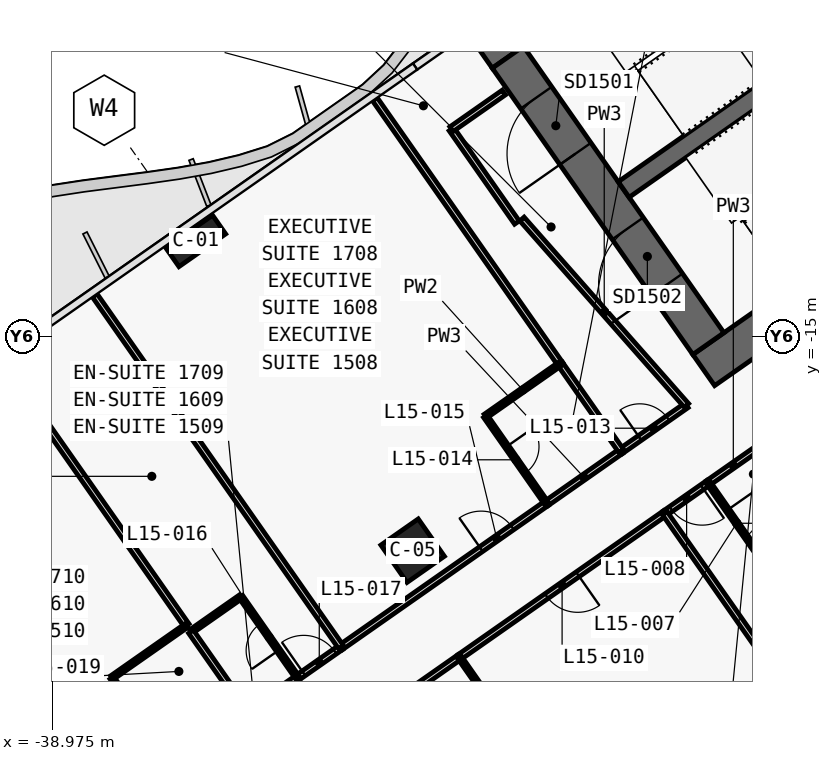
"""IFC4 building model, lengths in metres.
Left out: names, types, materials, properties, quantities, classifications, styles, units other than length and angle.
Written with IfcOpenShell. Run it as: python <this file> out.ifc"""

import sys

from ifc_helpers import new_model, si_unit, direction, frame, frame_2d, origin, origin_2d, place, context, subcontext, project, spatial, polyline, rectangle, outline, extrude, element, fill, save


model = new_model("IFC4")
c1 = context("Model", 3, precision=1e-05, world=origin(), true_north=direction((0.0, 1.0)))
c2 = subcontext(c1, "Body", "Model", "MODEL_VIEW")
j1 = project(units=[si_unit("LENGTHUNIT", "METRE"), si_unit("PLANEANGLEUNIT", "RADIAN")], contexts=[c1])
p1 = place(None, origin())
s1 = spatial("IfcSite", under=j1, at=p1, CompositionType="ELEMENT")
p2 = place(p1, origin())
s2 = spatial("IfcBuilding", under=s1, at=p2, CompositionType="ELEMENT")
p3 = place(p2, frame((0.0, 0.0, 79.7)))
s3 = spatial("IfcBuildingStorey", under=s2, at=p3, CompositionType="ELEMENT", Elevation=79.7)
p4 = place(p3, frame((0.037, 11.867, 0.0), z_axis=(0.0, 0.0, 1.0), x_axis=(-0.819155306259, -0.573571777746, 0.0)))
e1 = element("IfcWall", 1, at=p4, inside=s3, PredefinedType="SHEAR", context=c2, shape_type="SweptSolid", body=[
    extrude(outline(polyline([(33.837, 0.5), (0.7, 0.5), (0.0, -0.5), (33.837, -0.5), (33.837, 0.5)])), origin(), (0.0, 0.0, 1.0), 3.6),
])
p5 = place(p3, frame((0.037, -0.585, 0.0), z_axis=(0.0, 0.0, 1.0), x_axis=(-0.819157152511, -0.573569140985, 0.0)))
e2 = element("IfcWall", 2, at=p5, inside=s3, PredefinedType="SHEAR", context=c2, shape_type="SweptSolid", body=[
    extrude(outline(polyline([(26.695, 0.5), (0.7, 0.5), (0.0, -0.5), (26.695, -0.5), (26.695, 0.5)])), origin(), (0.0, 0.0, 1.0), 3.6),
])
p6 = place(p5, frame((2.995, 0.0, 0.0)))
e3 = element("IfcOpeningElement", 3, at=p6, cuts=e2, PredefinedType="OPENING", context=c2, shape_type="SweptSolid", body=[
    extrude(rectangle(XDim=2.4, YDim=2.1, at=frame_2d((1.2, 1.05))), frame((0.0, 0.51, 0.0), z_axis=(0.0, -1.0, 0.0), x_axis=(1.0, 0.0, 0.0)), (0.0, 0.0, 1.0), 1.02),
])
p7 = place(p5, frame((11.995, 0.0, 0.0)))
e4 = element("IfcOpeningElement", 4, at=p7, cuts=e2, PredefinedType="OPENING", context=c2, shape_type="SweptSolid", body=[
    extrude(rectangle(XDim=2.4, YDim=2.1, at=frame_2d((1.2, 1.05))), frame((0.0, 0.51, 0.0), z_axis=(0.0, -1.0, 0.0), x_axis=(1.0, 0.0, 0.0)), (0.0, 0.0, 1.0), 1.02),
])
p8 = place(p3, frame((-21.708, -15.2, 0.0), z_axis=(0.0, 0.0, 1.0), x_axis=(-0.573576324356, 0.819152122709, 0.0)))
e5 = element("IfcWall", 5, at=p8, inside=s3, PredefinedType="SHEAR", context=c2, shape_type="SweptSolid", body=[
    extrude(outline(polyline([(0.0, 0.5), (0.0, -0.5), (9.2, -0.5), (9.2, 0.5), (0.0, 0.5)])), origin(), (0.0, 0.0, 1.0), 3.6),
])
p9 = place(p8, frame((6.1, 0.0, 0.0)))
e6 = element("IfcOpeningElement", 6, at=p9, cuts=e5, PredefinedType="OPENING", context=c2, shape_type="SweptSolid", body=[
    extrude(rectangle(XDim=1.8, YDim=2.1, at=frame_2d((0.9, 1.05))), frame((0.0, 0.51, 0.0), z_axis=(0.0, -1.0, 0.0), x_axis=(1.0, 0.0, 0.0)), (0.0, 0.0, 1.0), 1.02),
])
p10 = place(p8, frame((1.9, 0.0, 0.0)))
e7 = element("IfcOpeningElement", 7, at=p10, cuts=e5, PredefinedType="OPENING", context=c2, shape_type="SweptSolid", body=[
    extrude(rectangle(XDim=1.8, YDim=2.1, at=frame_2d((0.9, 1.05))), frame((0.0, 0.51, 0.0), z_axis=(0.0, -1.0, 0.0), x_axis=(1.0, 0.0, 0.0)), (0.0, 0.0, 1.0), 1.02),
])
p11 = place(p3, frame((-2.638, 3.768, 0.0), z_axis=(0.0, 0.0, 1.0), x_axis=(-0.819148977158, -0.573580816643, 0.0)))
e8 = element("IfcWall", 8, at=p11, inside=s3, PredefinedType="SHEAR", context=c2, shape_type="SweptSolid", body=[
    extrude(outline(polyline([(26.0, 0.25), (0.0, 0.25), (0.0, -0.25), (26.0, -0.25), (26.0, 0.25)])), origin(), (0.0, 0.0, 1.0), 3.6),
])
p12 = place(p11, frame((1.169, 0.0, 0.0)))
e9 = element("IfcOpeningElement", 9, at=p12, cuts=e8, PredefinedType="OPENING", context=c2, shape_type="SweptSolid", body=[
    extrude(rectangle(XDim=1.1, YDim=2.1, at=frame_2d((0.55, 1.05))), frame((0.0, 0.26, 0.0), z_axis=(0.0, -1.0, 0.0), x_axis=(1.0, 0.0, 0.0)), (0.0, 0.0, 1.0), 0.52),
])
p13 = place(p11, frame((3.206, 0.0, 0.0)))
e10 = element("IfcOpeningElement", 10, at=p13, cuts=e8, PredefinedType="OPENING", context=c2, shape_type="SweptSolid", body=[
    extrude(rectangle(XDim=1.1, YDim=2.1, at=frame_2d((0.55, 1.05))), frame((0.0, 0.26, 0.0), z_axis=(0.0, -1.0, 0.0), x_axis=(1.0, 0.0, 0.0)), (0.0, 0.0, 1.0), 0.52),
])
p14 = place(p11, frame((5.244, 0.0, 0.0)))
e11 = element("IfcOpeningElement", 11, at=p14, cuts=e8, PredefinedType="OPENING", context=c2, shape_type="SweptSolid", body=[
    extrude(rectangle(XDim=1.1, YDim=2.1, at=frame_2d((0.55, 1.05))), frame((0.0, 0.26, 0.0), z_axis=(0.0, -1.0, 0.0), x_axis=(1.0, 0.0, 0.0)), (0.0, 0.0, 1.0), 0.52),
])
p15 = place(p11, frame((7.281, 0.0, 0.0)))
e12 = element("IfcOpeningElement", 12, at=p15, cuts=e8, PredefinedType="OPENING", context=c2, shape_type="SweptSolid", body=[
    extrude(rectangle(XDim=1.1, YDim=2.1, at=frame_2d((0.55, 1.05))), frame((0.0, 0.26, 0.0), z_axis=(0.0, -1.0, 0.0), x_axis=(1.0, 0.0, 0.0)), (0.0, 0.0, 1.0), 0.52),
])
p16 = place(p11, frame((9.688, 0.0, 0.0)))
e13 = element("IfcOpeningElement", 13, at=p16, cuts=e8, PredefinedType="OPENING", context=c2, shape_type="SweptSolid", body=[
    extrude(rectangle(XDim=1.1, YDim=2.1, at=frame_2d((0.55, 1.05))), frame((0.0, 0.26, 0.0), z_axis=(0.0, -1.0, 0.0), x_axis=(1.0, 0.0, 0.0)), (0.0, 0.0, 1.0), 0.52),
])
p17 = place(p11, frame((11.863, 0.0, 0.0)))
e14 = element("IfcOpeningElement", 14, at=p17, cuts=e8, PredefinedType="OPENING", context=c2, shape_type="SweptSolid", body=[
    extrude(rectangle(XDim=1.1, YDim=2.1, at=frame_2d((0.55, 1.05))), frame((0.0, 0.26, 0.0), z_axis=(0.0, -1.0, 0.0), x_axis=(1.0, 0.0, 0.0)), (0.0, 0.0, 1.0), 0.52),
])
p18 = place(p11, frame((14.038, 0.0, 0.0)))
e15 = element("IfcOpeningElement", 15, at=p18, cuts=e8, PredefinedType="OPENING", context=c2, shape_type="SweptSolid", body=[
    extrude(rectangle(XDim=1.1, YDim=2.1, at=frame_2d((0.55, 1.05))), frame((0.0, 0.26, 0.0), z_axis=(0.0, -1.0, 0.0), x_axis=(1.0, 0.0, 0.0)), (0.0, 0.0, 1.0), 0.52),
])
p19 = place(p11, frame((16.212, 0.0, 0.0)))
e16 = element("IfcOpeningElement", 16, at=p19, cuts=e8, PredefinedType="OPENING", context=c2, shape_type="SweptSolid", body=[
    extrude(rectangle(XDim=1.1, YDim=2.1, at=frame_2d((0.55, 1.05))), frame((0.0, 0.26, 0.0), z_axis=(0.0, -1.0, 0.0), x_axis=(1.0, 0.0, 0.0)), (0.0, 0.0, 1.0), 0.52),
])
p20 = place(p3, frame((-35.197, -12.498, 0.0), z_axis=(0.0, 0.0, 1.0), x_axis=(-0.819152044289, -0.573576436351, 0.0)))
e17 = element("IfcColumn", 17, at=p20, inside=s3, PredefinedType="COLUMN", context=c2, shape_type="SweptSolid", body=[
    extrude(rectangle(XDim=1.5, YDim=0.6, at=origin_2d()), origin(), (0.0, 0.0, 1.0), 3.6),
])
p21 = place(p3, frame((-29.49, -20.649, 0.0), z_axis=(0.0, 0.0, 1.0), x_axis=(-0.819152044289, -0.573576436351, 0.0)))
e18 = element("IfcColumn", 18, at=p21, inside=s3, PredefinedType="COLUMN", context=c2, shape_type="SweptSolid", body=[
    extrude(rectangle(XDim=1.2, YDim=1.2, at=origin_2d()), origin(), (0.0, 0.0, 1.0), 3.6),
])
p22 = place(p3, frame((-24.003, -18.028, 0.0), z_axis=(0.0, 0.0, 1.0), x_axis=(0.819160859995, 0.573563846013, 0.0)))
e19 = element("IfcWall", 19, at=p22, inside=s3, PredefinedType="PARTITIONING", context=c2, shape_type="SweptSolid", body=[
    extrude(rectangle(XDim=2.098, YDim=0.15, at=frame_2d((1.049, 0.0))), origin(), (0.0, 0.0, 1.0), 3.32),
])
p23 = place(p22, frame((0.599, 0.0, 0.0)))
e20 = element("IfcOpeningElement", 20, at=p23, cuts=e19, PredefinedType="OPENING", context=c2, shape_type="SweptSolid", body=[
    extrude(rectangle(XDim=0.9, YDim=2.1, at=frame_2d((0.45, 1.05))), frame((0.0, 0.085, 0.0), z_axis=(0.0, -1.0, 0.0), x_axis=(1.0, 0.0, 0.0)), (0.0, 0.0, 1.0), 0.17),
])
p24 = place(p3, frame((-31.375, -23.19, 0.0), z_axis=(0.0, 0.0, 1.0), x_axis=(0.819171118839, 0.573549194106, 0.0)))
e21 = element("IfcWall", 21, at=p24, inside=s3, PredefinedType="PARTITIONING", context=c2, shape_type="SweptSolid", body=[
    extrude(rectangle(XDim=6.603, YDim=0.15, at=frame_2d((3.302, 0.0))), origin(), (0.0, 0.0, 1.0), 2.6),
])
p25 = place(p24, frame((4.502, 0.0, 0.0)))
e22 = element("IfcOpeningElement", 22, at=p25, cuts=e21, PredefinedType="OPENING", context=c2, shape_type="SweptSolid", body=[
    extrude(rectangle(XDim=1.0, YDim=2.1, at=frame_2d((0.5, 1.05))), frame((0.0, 0.085, 0.0), z_axis=(0.0, -1.0, 0.0), x_axis=(1.0, 0.0, 0.0)), (0.0, 0.0, 1.0), 0.17),
])
p26 = place(p3, frame((-25.969, -19.404, 0.0), z_axis=(0.0, 0.0, 1.0), x_axis=(0.819146032251, 0.573585022335, 0.0)))
e23 = element("IfcWall", 23, at=p26, inside=s3, PredefinedType="PARTITIONING", context=c2, shape_type="SweptSolid", body=[
    extrude(rectangle(XDim=2.404, YDim=0.15, at=frame_2d((1.202, 0.0))), origin(), (0.0, 0.0, 1.0), 3.32),
])
p27 = place(p3, frame((-32.521, -23.992, 0.0), z_axis=(0.0, 0.0, 1.0), x_axis=(0.819199220913, 0.573509055252, 0.0)))
e24 = element("IfcWall", 24, at=p27, inside=s3, PredefinedType="PARTITIONING", context=c2, shape_type="SweptSolid", body=[
    extrude(rectangle(XDim=1.403, YDim=0.15, at=frame_2d((0.702, 0.0))), origin(), (0.0, 0.0, 1.0), 3.32),
])
p28 = place(p27, frame((0.201, 0.0, 0.0)))
e25 = element("IfcOpeningElement", 25, at=p28, cuts=e24, PredefinedType="OPENING", context=c2, shape_type="SweptSolid", body=[
    extrude(rectangle(XDim=1.0, YDim=2.1, at=frame_2d((0.5, 1.05))), frame((0.0, 0.085, 0.0), z_axis=(0.0, -1.0, 0.0), x_axis=(1.0, 0.0, 0.0)), (0.0, 0.0, 1.0), 0.17),
])
p29 = place(p3, frame((-33.833, -24.91, 0.0), z_axis=(0.0, 0.0, 1.0), x_axis=(0.819189013667, 0.573523634986, 0.0)))
e26 = element("IfcWall", 26, at=p29, inside=s3, PredefinedType="PARTITIONING", context=c2, shape_type="SweptSolid", body=[
    extrude(rectangle(XDim=1.604, YDim=0.15, at=frame_2d((0.802, 0.0))), origin(), (0.0, 0.0, 1.0), 3.32),
])
p30 = place(p3, frame((-21.706, -18.861, 0.0), z_axis=(0.0, 0.0, 1.0), x_axis=(-0.819060210533, -0.573707566205, 0.0)))
e27 = element("IfcWall", 27, at=p30, inside=s3, PredefinedType="PARTITIONING", context=c2, shape_type="SweptSolid", body=[
    extrude(rectangle(XDim=1.403, YDim=0.15, at=frame_2d((0.702, 0.0))), origin(), (0.0, 0.0, 1.0), 3.32),
])
p31 = place(p30, frame((0.201, 0.0, 0.0)))
e28 = element("IfcOpeningElement", 28, at=p31, cuts=e27, PredefinedType="OPENING", context=c2, shape_type="SweptSolid", body=[
    extrude(rectangle(XDim=1.0, YDim=2.1, at=frame_2d((0.5, 1.05))), frame((0.0, 0.085, 0.0), z_axis=(0.0, -1.0, 0.0), x_axis=(1.0, 0.0, 0.0)), (0.0, 0.0, 1.0), 0.17),
])
p32 = place(p3, frame((-20.395, -17.943, 0.0), z_axis=(0.0, 0.0, 1.0), x_axis=(-0.819189013667, -0.573523634986, 0.0)))
e29 = element("IfcWall", 29, at=p32, inside=s3, PredefinedType="PARTITIONING", context=c2, shape_type="SweptSolid", body=[
    extrude(rectangle(XDim=1.604, YDim=0.15, at=frame_2d((0.802, 0.0))), origin(), (0.0, 0.0, 1.0), 2.6),
])
p33 = place(p3, frame((-22.852, -19.664, 0.0), z_axis=(0.0, 0.0, 1.0), x_axis=(-0.819141582452, -0.573591377113, 0.0)))
e30 = element("IfcWall", 30, at=p33, inside=s3, PredefinedType="PARTITIONING", context=c2, shape_type="SweptSolid", body=[
    extrude(rectangle(XDim=6.603, YDim=0.15, at=frame_2d((3.301, 0.0))), origin(), (0.0, 0.0, 1.0), 2.6),
])
p34 = place(p33, frame((2.802, 0.0, 0.0)))
e31 = element("IfcOpeningElement", 31, at=p34, cuts=e30, PredefinedType="OPENING", context=c2, shape_type="SweptSolid", body=[
    extrude(rectangle(XDim=1.0, YDim=2.1, at=frame_2d((0.5, 1.05))), frame((0.0, 0.085, 0.0), z_axis=(0.0, -1.0, 0.0), x_axis=(1.0, 0.0, 0.0)), (0.0, 0.0, 1.0), 0.17),
])
p35 = place(p3, frame((-28.259, -23.449, 0.0), z_axis=(0.0, 0.0, 1.0), x_axis=(-0.819146032251, -0.573585022335, 0.0)))
e32 = element("IfcWall", 32, at=p35, inside=s3, PredefinedType="PARTITIONING", context=c2, shape_type="SweptSolid", body=[
    extrude(rectangle(XDim=2.404, YDim=0.15, at=frame_2d((1.202, 0.0))), origin(), (0.0, 0.0, 1.0), 3.32),
])
p36 = place(p3, frame((-26.746, -12.014, 0.0), z_axis=(0.0, 0.0, 1.0), x_axis=(-0.573560650686, 0.819163097304, 0.0)))
e33 = element("IfcWall", 33, at=p36, inside=s3, PredefinedType="PARTITIONING", context=c2, shape_type="SweptSolid", body=[
    extrude(rectangle(XDim=3.0, YDim=0.15, at=frame_2d((1.5, 0.0))), origin(), (0.0, 0.0, 1.0), 3.32),
])
p37 = place(p3, frame((-28.467, -9.556, 0.0), z_axis=(0.0, 0.0, 1.0), x_axis=(0.819109000826, 0.573637903879, 0.0)))
e34 = element("IfcWall", 34, at=p37, inside=s3, PredefinedType="PARTITIONING", context=c2, shape_type="SweptSolid", body=[
    extrude(rectangle(XDim=1.68, YDim=0.15, at=frame_2d((0.84, 0.0))), origin(), (0.0, 0.0, 1.0), 3.32),
])
p38 = place(p3, frame((-22.284, -16.827, 0.0), z_axis=(0.0, 0.0, 1.0), x_axis=(-0.661545117561, 0.749905365651, 0.0)))
e35 = element("IfcWall", 35, at=p38, inside=s3, PredefinedType="PARTITIONING", context=c2, shape_type="SweptSolid", body=[
    extrude(rectangle(XDim=6.543, YDim=0.15, at=frame_2d((3.271, 0.0))), origin(), (0.0, 0.0, 1.0), 2.6),
])
p39 = place(p3, frame((-25.606, -15.734, 0.0), z_axis=(0.0, 0.0, 1.0), x_axis=(-0.573576058406, 0.819152308929, 0.0)))
e36 = element("IfcWall", 36, at=p39, inside=s3, PredefinedType="PARTITIONING", context=c2, shape_type="SweptSolid", body=[
    extrude(rectangle(XDim=8.501, YDim=0.15, at=frame_2d((4.25, 0.0))), origin(), (0.0, 0.0, 1.0), 2.6),
])
p40 = place(p3, frame((-24.001, -18.026, 0.0), z_axis=(0.0, 0.0, 1.0), x_axis=(-0.573596837309, 0.819137759006, 0.0)))
e37 = element("IfcWall", 37, at=p40, inside=s3, PredefinedType="PARTITIONING", context=c2, shape_type="SweptSolid", body=[
    extrude(rectangle(XDim=2.802, YDim=0.15, at=frame_2d((1.401, 0.0))), origin(), (0.0, 0.0, 1.0), 2.6),
])
p41 = place(p3, frame((-25.608, -15.732, 0.0), z_axis=(0.0, 0.0, 1.0), x_axis=(-0.819107643868, -0.573639841501, 0.0)))
e38 = element("IfcWall", 38, at=p41, inside=s3, PredefinedType="PARTITIONING", context=c2, shape_type="SweptSolid", body=[
    extrude(rectangle(XDim=2.4, YDim=0.12, at=frame_2d((1.2, 0.0))), origin(), (0.0, 0.0, 1.0), 3.32),
])
p42 = place(p3, frame((-27.574, -17.11, 0.0), z_axis=(0.0, 0.0, 1.0), x_axis=(0.573591086599, -0.819141785879, 0.0)))
e39 = element("IfcWall", 39, at=p42, inside=s3, PredefinedType="PARTITIONING", context=c2, shape_type="SweptSolid", body=[
    extrude(rectangle(XDim=2.8, YDim=0.12, at=frame_2d((1.4, 0.0))), origin(), (0.0, 0.0, 1.0), 2.6),
])
p43 = place(p42, frame((0.975, 0.0, 0.0)))
e40 = element("IfcOpeningElement", 40, at=p43, cuts=e39, PredefinedType="OPENING", context=c2, shape_type="SweptSolid", body=[
    extrude(rectangle(XDim=0.85, YDim=2.05, at=frame_2d((0.425, 1.025))), frame((0.0, 0.07, 0.0), z_axis=(0.0, -1.0, 0.0), x_axis=(1.0, 0.0, 0.0)), (0.0, 0.0, 1.0), 0.14),
])
p44 = place(p3, frame((-31.373, -23.189, 0.0), z_axis=(0.0, 0.0, 1.0), x_axis=(-0.573571089604, 0.819155788095, 0.0)))
e41 = element("IfcWall", 41, at=p44, inside=s3, PredefinedType="PARTITIONING", context=c2, shape_type="SweptSolid", body=[
    extrude(rectangle(XDim=11.3, YDim=0.15, at=frame_2d((5.65, 0.0))), origin(), (0.0, 0.0, 1.0), 2.5),
])
p45 = place(p3, frame((-32.519, -23.991, 0.0), z_axis=(0.0, 0.0, 1.0), x_axis=(-0.573537965655, 0.819178980414, 0.0)))
e42 = element("IfcWall", 42, at=p45, inside=s3, PredefinedType="PARTITIONING", context=c2, shape_type="SweptSolid", body=[
    extrude(rectangle(XDim=2.6, YDim=0.12, at=frame_2d((1.3, 0.0))), origin(), (0.0, 0.0, 1.0), 2.6),
])
p46 = place(p45, frame((0.875, 0.0, 0.0)))
e43 = element("IfcOpeningElement", 43, at=p46, cuts=e42, PredefinedType="OPENING", context=c2, shape_type="SweptSolid", body=[
    extrude(rectangle(XDim=0.85, YDim=2.05, at=frame_2d((0.425, 1.025))), frame((0.0, 0.07, 0.0), z_axis=(0.0, -1.0, 0.0), x_axis=(1.0, 0.0, 0.0)), (0.0, 0.0, 1.0), 0.14),
])
p47 = place(p3, frame((-34.012, -21.861, 0.0), z_axis=(0.0, 0.0, 1.0), x_axis=(-0.81918174131, -0.573534022273, 0.0)))
e44 = element("IfcWall", 44, at=p47, inside=s3, PredefinedType="PARTITIONING", context=c2, shape_type="SweptSolid", body=[
    extrude(rectangle(XDim=1.6, YDim=0.12, at=frame_2d((0.8, 0.0))), origin(), (0.0, 0.0, 1.0), 3.32),
])
p48 = place(p3, frame((-35.436, -22.617, 0.0), z_axis=(0.0, 0.0, 1.0), x_axis=(-0.57356256513, 0.819161756848, 0.0)))
e45 = element("IfcWall", 45, at=p48, inside=s3, PredefinedType="PARTITIONING", context=c2, shape_type="SweptSolid", body=[
    extrude(rectangle(XDim=8.501, YDim=0.15, at=frame_2d((4.25, 0.0))), origin(), (0.0, 0.0, 1.0), 2.5),
])
p49 = place(p3, frame((-33.831, -24.909, 0.0), z_axis=(0.0, 0.0, 1.0), x_axis=(-0.573537965655, 0.819178980414, 0.0)))
e46 = element("IfcWall", 46, at=p49, inside=s3, PredefinedType="PARTITIONING", context=c2, shape_type="SweptSolid", body=[
    extrude(rectangle(XDim=2.6, YDim=0.15, at=frame_2d((1.3, 0.0))), origin(), (0.0, 0.0, 1.0), 2.6),
])
p50 = place(p3, frame((-35.438, -22.615, 0.0), z_axis=(0.0, 0.0, 1.0), x_axis=(-0.819155442668, -0.573571582932, 0.0)))
e47 = element("IfcWall", 47, at=p50, inside=s3, PredefinedType="PARTITIONING", context=c2, shape_type="SweptSolid", body=[
    extrude(rectangle(XDim=2.4, YDim=0.12, at=frame_2d((1.2, 0.0))), origin(), (0.0, 0.0, 1.0), 3.32),
])
p51 = place(p3, frame((-37.404, -23.993, 0.0), z_axis=(0.0, 0.0, 1.0), x_axis=(0.573550118428, -0.819170471667, 0.0)))
e48 = element("IfcWall", 48, at=p51, inside=s3, PredefinedType="PARTITIONING", context=c2, shape_type="SweptSolid", body=[
    extrude(rectangle(XDim=2.8, YDim=0.12, at=frame_2d((1.4, 0.0))), origin(), (0.0, 0.0, 1.0), 2.6),
])
p52 = place(p51, frame((0.975, 0.0, 0.0)))
e49 = element("IfcOpeningElement", 49, at=p52, cuts=e48, PredefinedType="OPENING", context=c2, shape_type="SweptSolid", body=[
    extrude(rectangle(XDim=0.85, YDim=2.05, at=frame_2d((0.425, 1.025))), frame((0.0, 0.07, 0.0), z_axis=(0.0, -1.0, 0.0), x_axis=(1.0, 0.0, 0.0)), (0.0, 0.0, 1.0), 0.14),
])
p53 = place(p3, frame((-21.708, -18.862, 0.0), z_axis=(0.0, 0.0, 1.0), x_axis=(0.573537965655, -0.819178980414, 0.0)))
e50 = element("IfcWall", 50, at=p53, inside=s3, PredefinedType="PARTITIONING", context=c2, shape_type="SweptSolid", body=[
    extrude(rectangle(XDim=2.6, YDim=0.12, at=frame_2d((1.3, 0.0))), origin(), (0.0, 0.0, 1.0), 3.32),
])
p54 = place(p53, frame((0.875, 0.0, 0.0)))
e51 = element("IfcOpeningElement", 51, at=p54, cuts=e50, PredefinedType="OPENING", context=c2, shape_type="SweptSolid", body=[
    extrude(rectangle(XDim=0.85, YDim=2.05, at=frame_2d((0.425, 1.025))), frame((0.0, 0.07, 0.0), z_axis=(0.0, -1.0, 0.0), x_axis=(1.0, 0.0, 0.0)), (0.0, 0.0, 1.0), 0.14),
])
p55 = place(p3, frame((-18.667, -25.645, 0.0), z_axis=(0.0, 0.0, 1.0), x_axis=(-0.573572324301, 0.819154923562, 0.0)))
e52 = element("IfcWall", 52, at=p55, inside=s3, PredefinedType="PARTITIONING", context=c2, shape_type="SweptSolid", body=[
    extrude(rectangle(XDim=7.3, YDim=0.15, at=frame_2d((3.65, 0.0))), origin(), (0.0, 0.0, 1.0), 2.5),
])
p56 = place(p3, frame((-26.653, -25.743, 0.0), z_axis=(0.0, 0.0, 1.0), x_axis=(-0.573608623498, 0.819129505664, 0.0)))
e53 = element("IfcWall", 53, at=p56, inside=s3, PredefinedType="PARTITIONING", context=c2, shape_type="SweptSolid", body=[
    extrude(rectangle(XDim=2.8, YDim=0.12, at=frame_2d((1.4, 0.0))), origin(), (0.0, 0.0, 1.0), 3.32),
])
p57 = place(p56, frame((0.975, 0.0, 0.0)))
e54 = element("IfcOpeningElement", 54, at=p57, cuts=e53, PredefinedType="OPENING", context=c2, shape_type="SweptSolid", body=[
    extrude(rectangle(XDim=0.85, YDim=2.05, at=frame_2d((0.425, 1.025))), frame((0.0, 0.07, 0.0), z_axis=(0.0, -1.0, 0.0), x_axis=(1.0, 0.0, 0.0)), (0.0, 0.0, 1.0), 0.14),
])
p58 = place(p9, origin())
e55 = element("IfcDoor", 55, at=p58, inside=s3, OperationType="DOUBLE_DOOR_SINGLE_SWING", PredefinedType="DOOR", context=c2, shape_type="SweptSolid", body=[
    extrude(rectangle(XDim=1.8, YDim=2.1, at=frame_2d((0.9, 1.05))), frame((0.0, 0.025, 0.0), z_axis=(0.0, -1.0, 0.0), x_axis=(1.0, 0.0, 0.0)), (0.0, 0.0, 1.0), 0.05),
])
fill(e6, e55)
p59 = place(p10, origin())
e56 = element("IfcDoor", 56, at=p59, inside=s3, OperationType="DOUBLE_DOOR_SINGLE_SWING", PredefinedType="DOOR", context=c2, shape_type="SweptSolid", body=[
    extrude(rectangle(XDim=1.8, YDim=2.1, at=frame_2d((0.9, 1.05))), frame((0.0, 0.025, 0.0), z_axis=(0.0, -1.0, 0.0), x_axis=(1.0, 0.0, 0.0)), (0.0, 0.0, 1.0), 0.05),
])
fill(e7, e56)
p60 = place(p54, origin())
e57 = element("IfcDoor", 57, at=p60, inside=s3, OperationType="SINGLE_SWING_RIGHT", PredefinedType="DOOR", context=c2, shape_type="SweptSolid", body=[
    extrude(rectangle(XDim=0.85, YDim=2.05, at=frame_2d((0.425, 1.025))), frame((0.0, 0.025, 0.0), z_axis=(0.0, -1.0, 0.0), x_axis=(1.0, 0.0, 0.0)), (0.0, 0.0, 1.0), 0.05),
])
fill(e51, e57)
p61 = place(p31, origin())
e58 = element("IfcDoor", 58, at=p61, inside=s3, OperationType="SINGLE_SWING_LEFT", PredefinedType="DOOR", context=c2, shape_type="SweptSolid", body=[
    extrude(rectangle(XDim=1.0, YDim=2.1, at=frame_2d((0.5, 1.05))), frame((0.0, 0.025, 0.0), z_axis=(0.0, -1.0, 0.0), x_axis=(1.0, 0.0, 0.0)), (0.0, 0.0, 1.0), 0.05),
])
fill(e28, e58)
p62 = place(p34, origin())
e59 = element("IfcDoor", 59, at=p62, inside=s3, OperationType="SINGLE_SWING_LEFT", PredefinedType="DOOR", context=c2, shape_type="SweptSolid", body=[
    extrude(rectangle(XDim=1.0, YDim=2.1, at=frame_2d((0.5, 1.05))), frame((0.0, 0.025, 0.0), z_axis=(0.0, -1.0, 0.0), x_axis=(1.0, 0.0, 0.0)), (0.0, 0.0, 1.0), 0.05),
])
fill(e31, e59)
p63 = place(p23, origin())
e60 = element("IfcDoor", 60, at=p63, inside=s3, OperationType="SINGLE_SWING_LEFT", PredefinedType="DOOR", context=c2, shape_type="SweptSolid", body=[
    extrude(rectangle(XDim=0.9, YDim=2.1, at=frame_2d((0.45, 1.05))), frame((0.0, 0.025, 0.0), z_axis=(0.0, -1.0, 0.0), x_axis=(1.0, 0.0, 0.0)), (0.0, 0.0, 1.0), 0.05),
])
fill(e20, e60)
p64 = place(p43, origin())
e61 = element("IfcDoor", 61, at=p64, inside=s3, OperationType="SINGLE_SWING_RIGHT", PredefinedType="DOOR", context=c2, shape_type="SweptSolid", body=[
    extrude(rectangle(XDim=0.85, YDim=2.05, at=frame_2d((0.425, 1.025))), frame((0.0, 0.025, 0.0), z_axis=(0.0, -1.0, 0.0), x_axis=(1.0, 0.0, 0.0)), (0.0, 0.0, 1.0), 0.05),
])
fill(e40, e61)
p65 = place(p25, origin())
e62 = element("IfcDoor", 62, at=p65, inside=s3, OperationType="SINGLE_SWING_LEFT", PredefinedType="DOOR", context=c2, shape_type="SweptSolid", body=[
    extrude(rectangle(XDim=1.0, YDim=2.1, at=frame_2d((0.5, 1.05))), frame((0.0, 0.025, 0.0), z_axis=(0.0, -1.0, 0.0), x_axis=(1.0, 0.0, 0.0)), (0.0, 0.0, 1.0), 0.05),
])
fill(e22, e62)
p66 = place(p46, origin())
e63 = element("IfcDoor", 63, at=p66, inside=s3, OperationType="SINGLE_SWING_LEFT", PredefinedType="DOOR", context=c2, shape_type="SweptSolid", body=[
    extrude(rectangle(XDim=0.85, YDim=2.05, at=frame_2d((0.425, 1.025))), frame((0.0, 0.025, 0.0), z_axis=(0.0, -1.0, 0.0), x_axis=(1.0, 0.0, 0.0)), (0.0, 0.0, 1.0), 0.05),
])
fill(e43, e63)
p67 = place(p28, origin())
e64 = element("IfcDoor", 64, at=p67, inside=s3, OperationType="SINGLE_SWING_RIGHT", PredefinedType="DOOR", context=c2, shape_type="SweptSolid", body=[
    extrude(rectangle(XDim=1.0, YDim=2.1, at=frame_2d((0.5, 1.05))), frame((0.0, 0.025, 0.0), z_axis=(0.0, -1.0, 0.0), x_axis=(1.0, 0.0, 0.0)), (0.0, 0.0, 1.0), 0.05),
])
fill(e25, e64)
save(model, sys.argv[1])
